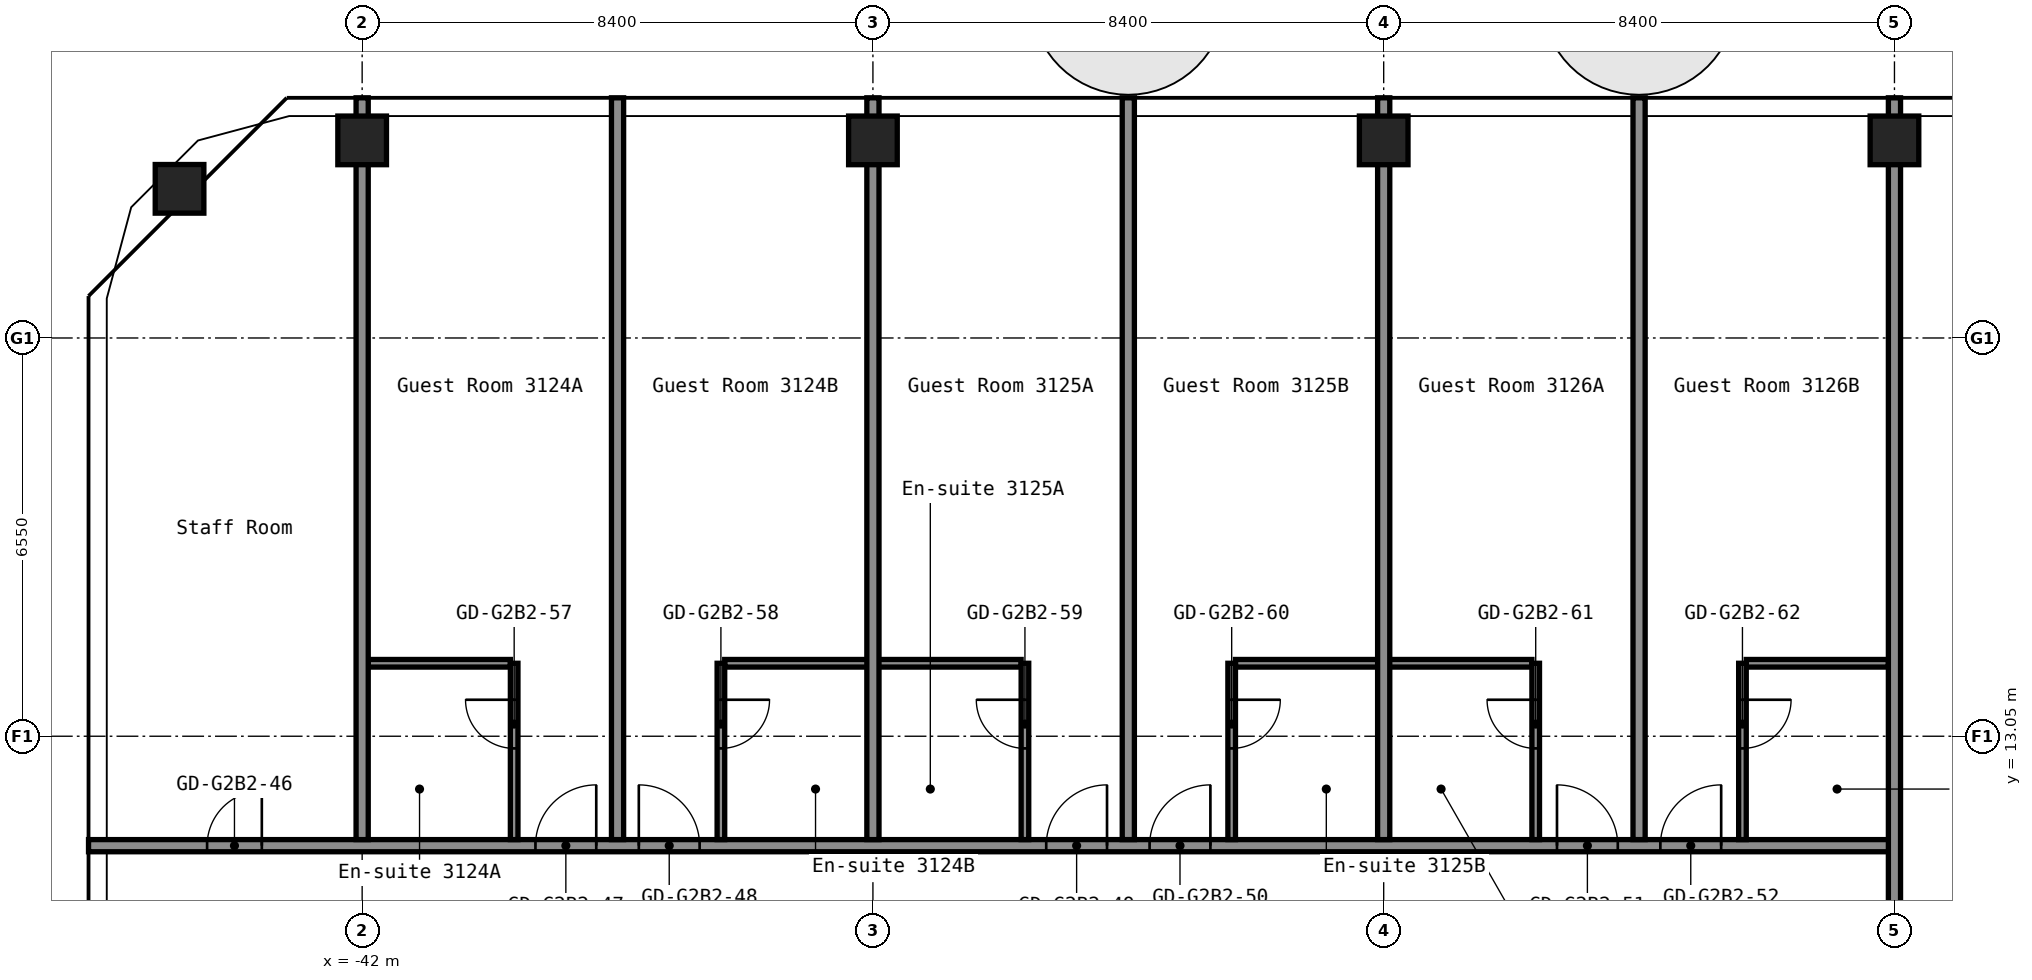
"""IFC4 building model, lengths in metres.
Left out: names, types, materials, properties, quantities, classifications, styles, units other than length and angle.
Written with IfcOpenShell. Run it as: python <this file> out.ifc"""

import sys

from ifc_helpers import new_model, si_unit, direction, frame, frame_2d, origin, origin_2d, place, context, subcontext, project, spatial, rectangle, hollow_rectangle, extrude, element, fill, save


model = new_model("IFC4")
c1 = context("Model", 3, precision=1e-05, world=origin(), true_north=direction((0.0, 1.0)))
c2 = subcontext(c1, "Body", "Model", "MODEL_VIEW")
j1 = project(units=[si_unit("LENGTHUNIT", "METRE"), si_unit("PLANEANGLEUNIT", "RADIAN")], contexts=[c1])
p1 = place(None, origin())
s1 = spatial("IfcSite", under=j1, at=p1, CompositionType="ELEMENT")
p2 = place(p1, origin())
s2 = spatial("IfcBuilding", under=s1, at=p2, CompositionType="ELEMENT")
p3 = place(p2, frame((0.0, 0.0, 110.6)))
s3 = spatial("IfcBuildingStorey", under=s2, at=p3, CompositionType="ELEMENT", Elevation=110.6)
for number, where, z_axis, x_axis in (
    (1, (-45.003, 22.053, 0.0), (0.0, 0.0, 1.0), (1.0, 0.0, 0.0)),
    (2, (-42.0, 22.85, 0.0), (0.0, 0.0, 1.0), (1.0, 0.0, 0.0)),
    (3, (-33.6, 22.85, 0.0), (0.0, 0.0, 1.0), (1.0, 0.0, 0.0)),
    (4, (-25.2, 22.85, 0.0), (0.0, 0.0, 1.0), (1.0, 0.0, 0.0)),
    (5, (-16.8, 22.85, 0.0), (0.0, 0.0, 1.0), (1.0, 0.0, 0.0)),
):
    element("IfcColumn", number, at=place(p3, frame(where, z_axis=z_axis, x_axis=x_axis)), inside=s3, PredefinedType="COLUMN", context=c2, shape_type="SweptSolid", body=[
        extrude(hollow_rectangle(XDim=0.8, YDim=0.8, WallThickness=0.032, at=origin_2d()), origin(), (0.0, 0.0, 1.0), 2.8),
    ])
p4 = place(p3, frame((-46.5, 11.25, 0.0), z_axis=(0.0, 0.0, 1.0), x_axis=(1.0, 0.0, 0.0)))
e6 = element("IfcWall", 6, at=p4, inside=s3, PredefinedType="PARTITIONING", context=c2, shape_type="SweptSolid", body=[
    extrude(rectangle(XDim=29.7, YDim=0.2, at=frame_2d((14.85, 0.0))), origin(), (0.0, 0.0, 1.0), 2.8),
])
p5 = place(p4, frame((1.95, 0.0, 0.0)))
e7 = element("IfcOpeningElement", 7, at=p5, cuts=e6, PredefinedType="OPENING", context=c2, shape_type="SweptSolid", body=[
    extrude(rectangle(XDim=0.9, YDim=2.1, at=frame_2d((0.45, 1.05))), frame((0.0, 0.11, 0.0), z_axis=(0.0, -1.0, 0.0), x_axis=(1.0, 0.0, 0.0)), (0.0, 0.0, 1.0), 0.22),
])
p6 = place(p4, frame((7.35, 0.0, 0.0)))
e8 = element("IfcOpeningElement", 8, at=p6, cuts=e6, PredefinedType="OPENING", context=c2, shape_type="SweptSolid", body=[
    extrude(rectangle(XDim=1.0, YDim=2.1, at=frame_2d((0.5, 1.05))), frame((0.0, 0.11, 0.0), z_axis=(0.0, -1.0, 0.0), x_axis=(1.0, 0.0, 0.0)), (0.0, 0.0, 1.0), 0.22),
])
p7 = place(p4, frame((9.05, 0.0, 0.0)))
e9 = element("IfcOpeningElement", 9, at=p7, cuts=e6, PredefinedType="OPENING", context=c2, shape_type="SweptSolid", body=[
    extrude(rectangle(XDim=1.0, YDim=2.1, at=frame_2d((0.5, 1.05))), frame((0.0, 0.11, 0.0), z_axis=(0.0, -1.0, 0.0), x_axis=(1.0, 0.0, 0.0)), (0.0, 0.0, 1.0), 0.22),
])
p8 = place(p4, frame((15.75, 0.0, 0.0)))
e10 = element("IfcOpeningElement", 10, at=p8, cuts=e6, PredefinedType="OPENING", context=c2, shape_type="SweptSolid", body=[
    extrude(rectangle(XDim=1.0, YDim=2.1, at=frame_2d((0.5, 1.05))), frame((0.0, 0.11, 0.0), z_axis=(0.0, -1.0, 0.0), x_axis=(1.0, 0.0, 0.0)), (0.0, 0.0, 1.0), 0.22),
])
p9 = place(p4, frame((17.45, 0.0, 0.0)))
e11 = element("IfcOpeningElement", 11, at=p9, cuts=e6, PredefinedType="OPENING", context=c2, shape_type="SweptSolid", body=[
    extrude(rectangle(XDim=1.0, YDim=2.1, at=frame_2d((0.5, 1.05))), frame((0.0, 0.11, 0.0), z_axis=(0.0, -1.0, 0.0), x_axis=(1.0, 0.0, 0.0)), (0.0, 0.0, 1.0), 0.22),
])
p10 = place(p4, frame((24.15, 0.0, 0.0)))
e12 = element("IfcOpeningElement", 12, at=p10, cuts=e6, PredefinedType="OPENING", context=c2, shape_type="SweptSolid", body=[
    extrude(rectangle(XDim=1.0, YDim=2.1, at=frame_2d((0.5, 1.05))), frame((0.0, 0.11, 0.0), z_axis=(0.0, -1.0, 0.0), x_axis=(1.0, 0.0, 0.0)), (0.0, 0.0, 1.0), 0.22),
])
p11 = place(p4, frame((25.85, 0.0, 0.0)))
e13 = element("IfcOpeningElement", 13, at=p11, cuts=e6, PredefinedType="OPENING", context=c2, shape_type="SweptSolid", body=[
    extrude(rectangle(XDim=1.0, YDim=2.1, at=frame_2d((0.5, 1.05))), frame((0.0, 0.11, 0.0), z_axis=(0.0, -1.0, 0.0), x_axis=(1.0, 0.0, 0.0)), (0.0, 0.0, 1.0), 0.22),
])
p12 = place(p3, frame((-41.9, 14.25, 0.0), z_axis=(0.0, 0.0, 1.0), x_axis=(1.0, 0.0, 0.0)))
e14 = element("IfcWall", 14, at=p12, inside=s3, PredefinedType="PARTITIONING", context=c2, shape_type="SweptSolid", body=[
    extrude(rectangle(XDim=2.337, YDim=0.125, at=frame_2d((1.169, 0.0))), origin(), (0.0, 0.0, 1.0), 2.8),
])
for number, where, z_axis, x_axis in (
    (15, (-36.038, 14.25, 0.0), (0.0, 0.0, 1.0), (1.0, 0.0, 0.0)),
    (16, (-27.637, 14.25, 0.0), (0.0, 0.0, 1.0), (1.0, 0.0, 0.0)),
):
    element("IfcWall", number, at=place(p3, frame(where, z_axis=z_axis, x_axis=x_axis)), inside=s3, PredefinedType="PARTITIONING", context=c2, shape_type="SweptSolid", body=[
        extrude(rectangle(XDim=4.875, YDim=0.125, at=frame_2d((2.438, 0.0))), origin(), (0.0, 0.0, 1.0), 2.8),
    ])
p13 = place(p3, frame((-19.238, 14.25, 0.0), z_axis=(0.0, 0.0, 1.0), x_axis=(1.0, 0.0, 0.0)))
e17 = element("IfcWall", 17, at=p13, inside=s3, PredefinedType="PARTITIONING", context=c2, shape_type="SweptSolid", body=[
    extrude(rectangle(XDim=2.338, YDim=0.125, at=frame_2d((1.169, 0.0))), origin(), (0.0, 0.0, 1.0), 2.8),
])
p14 = place(p3, frame((-42.0, 11.35, 0.0), z_axis=(0.0, 0.0, 1.0), x_axis=(0.0, 1.0, 0.0)))
e18 = element("IfcWall", 18, at=p14, inside=s3, PredefinedType="PARTITIONING", context=c2, shape_type="SweptSolid", body=[
    extrude(rectangle(XDim=12.2, YDim=0.2, at=frame_2d((6.1, 0.0))), origin(), (0.0, 0.0, 1.0), 2.8),
])
p15 = place(p3, frame((-39.5, 11.35, 0.0), z_axis=(0.0, 0.0, 1.0), x_axis=(0.0, 1.0, 0.0)))
e19 = element("IfcWall", 19, at=p15, inside=s3, PredefinedType="PARTITIONING", context=c2, shape_type="SweptSolid", body=[
    extrude(rectangle(XDim=2.9, YDim=0.125, at=frame_2d((1.45, 0.0))), origin(), (0.0, 0.0, 1.0), 2.8),
])
p16 = place(p15, frame((1.5, 0.0, 0.0)))
e20 = element("IfcOpeningElement", 20, at=p16, cuts=e19, PredefinedType="OPENING", context=c2, shape_type="SweptSolid", body=[
    extrude(rectangle(XDim=0.8, YDim=2.1, at=frame_2d((0.4, 1.05))), frame((0.0, 0.073, 0.0), z_axis=(0.0, -1.0, 0.0), x_axis=(1.0, 0.0, 0.0)), (0.0, 0.0, 1.0), 0.145),
])
p17 = place(p3, frame((-37.8, 11.35, 0.0), z_axis=(0.0, 0.0, 1.0), x_axis=(0.0, 1.0, 0.0)))
e21 = element("IfcWall", 21, at=p17, inside=s3, PredefinedType="PARTITIONING", context=c2, shape_type="SweptSolid", body=[
    extrude(rectangle(XDim=12.2, YDim=0.2, at=frame_2d((6.1, 0.0))), origin(), (0.0, 0.0, 1.0), 2.8),
])
p18 = place(p3, frame((-36.1, 11.35, 0.0), z_axis=(0.0, 0.0, 1.0), x_axis=(0.0, 1.0, 0.0)))
e22 = element("IfcWall", 22, at=p18, inside=s3, PredefinedType="PARTITIONING", context=c2, shape_type="SweptSolid", body=[
    extrude(rectangle(XDim=2.9, YDim=0.125, at=frame_2d((1.45, 0.0))), origin(), (0.0, 0.0, 1.0), 2.8),
])
p19 = place(p18, frame((1.5, 0.0, 0.0)))
e23 = element("IfcOpeningElement", 23, at=p19, cuts=e22, PredefinedType="OPENING", context=c2, shape_type="SweptSolid", body=[
    extrude(rectangle(XDim=0.8, YDim=2.1, at=frame_2d((0.4, 1.05))), frame((0.0, 0.073, 0.0), z_axis=(0.0, -1.0, 0.0), x_axis=(1.0, 0.0, 0.0)), (0.0, 0.0, 1.0), 0.145),
])
p20 = place(p3, frame((-33.6, 11.35, 0.0), z_axis=(0.0, 0.0, 1.0), x_axis=(0.0, 1.0, 0.0)))
e24 = element("IfcWall", 24, at=p20, inside=s3, PredefinedType="PARTITIONING", context=c2, shape_type="SweptSolid", body=[
    extrude(rectangle(XDim=12.2, YDim=0.2, at=frame_2d((6.1, 0.0))), origin(), (0.0, 0.0, 1.0), 2.8),
])
p21 = place(p3, frame((-31.1, 11.35, 0.0), z_axis=(0.0, 0.0, 1.0), x_axis=(0.0, 1.0, 0.0)))
e25 = element("IfcWall", 25, at=p21, inside=s3, PredefinedType="PARTITIONING", context=c2, shape_type="SweptSolid", body=[
    extrude(rectangle(XDim=2.9, YDim=0.125, at=frame_2d((1.45, 0.0))), origin(), (0.0, 0.0, 1.0), 2.8),
])
p22 = place(p21, frame((1.5, 0.0, 0.0)))
e26 = element("IfcOpeningElement", 26, at=p22, cuts=e25, PredefinedType="OPENING", context=c2, shape_type="SweptSolid", body=[
    extrude(rectangle(XDim=0.8, YDim=2.1, at=frame_2d((0.4, 1.05))), frame((0.0, 0.073, 0.0), z_axis=(0.0, -1.0, 0.0), x_axis=(1.0, 0.0, 0.0)), (0.0, 0.0, 1.0), 0.145),
])
p23 = place(p3, frame((-29.4, 11.35, 0.0), z_axis=(0.0, 0.0, 1.0), x_axis=(0.0, 1.0, 0.0)))
e27 = element("IfcWall", 27, at=p23, inside=s3, PredefinedType="PARTITIONING", context=c2, shape_type="SweptSolid", body=[
    extrude(rectangle(XDim=12.2, YDim=0.2, at=frame_2d((6.1, 0.0))), origin(), (0.0, 0.0, 1.0), 2.8),
])
p24 = place(p3, frame((-27.7, 11.35, 0.0), z_axis=(0.0, 0.0, 1.0), x_axis=(0.0, 1.0, 0.0)))
e28 = element("IfcWall", 28, at=p24, inside=s3, PredefinedType="PARTITIONING", context=c2, shape_type="SweptSolid", body=[
    extrude(rectangle(XDim=2.9, YDim=0.125, at=frame_2d((1.45, 0.0))), origin(), (0.0, 0.0, 1.0), 2.8),
])
p25 = place(p24, frame((1.5, 0.0, 0.0)))
e29 = element("IfcOpeningElement", 29, at=p25, cuts=e28, PredefinedType="OPENING", context=c2, shape_type="SweptSolid", body=[
    extrude(rectangle(XDim=0.8, YDim=2.1, at=frame_2d((0.4, 1.05))), frame((0.0, 0.073, 0.0), z_axis=(0.0, -1.0, 0.0), x_axis=(1.0, 0.0, 0.0)), (0.0, 0.0, 1.0), 0.145),
])
p26 = place(p3, frame((-25.2, 11.35, 0.0), z_axis=(0.0, 0.0, 1.0), x_axis=(0.0, 1.0, 0.0)))
e30 = element("IfcWall", 30, at=p26, inside=s3, PredefinedType="PARTITIONING", context=c2, shape_type="SweptSolid", body=[
    extrude(rectangle(XDim=12.2, YDim=0.2, at=frame_2d((6.1, 0.0))), origin(), (0.0, 0.0, 1.0), 2.8),
])
p27 = place(p3, frame((-22.7, 11.35, 0.0), z_axis=(0.0, 0.0, 1.0), x_axis=(0.0, 1.0, 0.0)))
e31 = element("IfcWall", 31, at=p27, inside=s3, PredefinedType="PARTITIONING", context=c2, shape_type="SweptSolid", body=[
    extrude(rectangle(XDim=2.9, YDim=0.125, at=frame_2d((1.45, 0.0))), origin(), (0.0, 0.0, 1.0), 2.8),
])
p28 = place(p27, frame((1.5, 0.0, 0.0)))
e32 = element("IfcOpeningElement", 32, at=p28, cuts=e31, PredefinedType="OPENING", context=c2, shape_type="SweptSolid", body=[
    extrude(rectangle(XDim=0.8, YDim=2.1, at=frame_2d((0.4, 1.05))), frame((0.0, 0.073, 0.0), z_axis=(0.0, -1.0, 0.0), x_axis=(1.0, 0.0, 0.0)), (0.0, 0.0, 1.0), 0.145),
])
p29 = place(p3, frame((-21.0, 11.35, 0.0), z_axis=(0.0, 0.0, 1.0), x_axis=(0.0, 1.0, 0.0)))
e33 = element("IfcWall", 33, at=p29, inside=s3, PredefinedType="PARTITIONING", context=c2, shape_type="SweptSolid", body=[
    extrude(rectangle(XDim=12.2, YDim=0.2, at=frame_2d((6.1, 0.0))), origin(), (0.0, 0.0, 1.0), 2.8),
])
p30 = place(p3, frame((-19.3, 11.35, 0.0), z_axis=(0.0, 0.0, 1.0), x_axis=(0.0, 1.0, 0.0)))
e34 = element("IfcWall", 34, at=p30, inside=s3, PredefinedType="PARTITIONING", context=c2, shape_type="SweptSolid", body=[
    extrude(rectangle(XDim=2.9, YDim=0.125, at=frame_2d((1.45, 0.0))), origin(), (0.0, 0.0, 1.0), 2.8),
])
p31 = place(p30, frame((1.5, 0.0, 0.0)))
e35 = element("IfcOpeningElement", 35, at=p31, cuts=e34, PredefinedType="OPENING", context=c2, shape_type="SweptSolid", body=[
    extrude(rectangle(XDim=0.8, YDim=2.1, at=frame_2d((0.4, 1.05))), frame((0.0, 0.073, 0.0), z_axis=(0.0, -1.0, 0.0), x_axis=(1.0, 0.0, 0.0)), (0.0, 0.0, 1.0), 0.145),
])
p32 = place(p3, frame((-16.8, 10.19, 0.0), z_axis=(0.0, 0.0, 1.0), x_axis=(0.0, 1.0, 0.0)))
e36 = element("IfcWall", 36, at=p32, inside=s3, PredefinedType="PARTITIONING", context=c2, shape_type="SweptSolid", body=[
    extrude(rectangle(XDim=13.36, YDim=0.2, at=frame_2d((6.68, 0.0))), origin(), (0.0, 0.0, 1.0), 2.8),
])
p33 = place(p5, origin())
e37 = element("IfcDoor", 37, at=p33, inside=s3, OperationType="SINGLE_SWING_LEFT", PredefinedType="DOOR", context=c2, shape_type="SweptSolid", body=[
    extrude(rectangle(XDim=0.9, YDim=2.1, at=frame_2d((0.45, 1.05))), frame((0.0, 0.025, 0.0), z_axis=(0.0, -1.0, 0.0), x_axis=(1.0, 0.0, 0.0)), (0.0, 0.0, 1.0), 0.05),
])
fill(e7, e37)
p34 = place(p6, origin())
e38 = element("IfcDoor", 38, at=p34, inside=s3, OperationType="SINGLE_SWING_LEFT", PredefinedType="DOOR", context=c2, shape_type="SweptSolid", body=[
    extrude(rectangle(XDim=1.0, YDim=2.1, at=frame_2d((0.5, 1.05))), frame((0.0, 0.025, 0.0), z_axis=(0.0, -1.0, 0.0), x_axis=(1.0, 0.0, 0.0)), (0.0, 0.0, 1.0), 0.05),
])
fill(e8, e38)
p35 = place(p7, origin())
e39 = element("IfcDoor", 39, at=p35, inside=s3, OperationType="SINGLE_SWING_RIGHT", PredefinedType="DOOR", context=c2, shape_type="SweptSolid", body=[
    extrude(rectangle(XDim=1.0, YDim=2.1, at=frame_2d((0.5, 1.05))), frame((0.0, 0.025, 0.0), z_axis=(0.0, -1.0, 0.0), x_axis=(1.0, 0.0, 0.0)), (0.0, 0.0, 1.0), 0.05),
])
fill(e9, e39)
p36 = place(p8, origin())
e40 = element("IfcDoor", 40, at=p36, inside=s3, OperationType="SINGLE_SWING_LEFT", PredefinedType="DOOR", context=c2, shape_type="SweptSolid", body=[
    extrude(rectangle(XDim=1.0, YDim=2.1, at=frame_2d((0.5, 1.05))), frame((0.0, 0.025, 0.0), z_axis=(0.0, -1.0, 0.0), x_axis=(1.0, 0.0, 0.0)), (0.0, 0.0, 1.0), 0.05),
])
fill(e10, e40)
p37 = place(p9, origin())
e41 = element("IfcDoor", 41, at=p37, inside=s3, OperationType="SINGLE_SWING_LEFT", PredefinedType="DOOR", context=c2, shape_type="SweptSolid", body=[
    extrude(rectangle(XDim=1.0, YDim=2.1, at=frame_2d((0.5, 1.05))), frame((0.0, 0.025, 0.0), z_axis=(0.0, -1.0, 0.0), x_axis=(1.0, 0.0, 0.0)), (0.0, 0.0, 1.0), 0.05),
])
fill(e11, e41)
p38 = place(p10, origin())
e42 = element("IfcDoor", 42, at=p38, inside=s3, OperationType="SINGLE_SWING_RIGHT", PredefinedType="DOOR", context=c2, shape_type="SweptSolid", body=[
    extrude(rectangle(XDim=1.0, YDim=2.1, at=frame_2d((0.5, 1.05))), frame((0.0, 0.025, 0.0), z_axis=(0.0, -1.0, 0.0), x_axis=(1.0, 0.0, 0.0)), (0.0, 0.0, 1.0), 0.05),
])
fill(e12, e42)
p39 = place(p11, origin())
e43 = element("IfcDoor", 43, at=p39, inside=s3, OperationType="SINGLE_SWING_LEFT", PredefinedType="DOOR", context=c2, shape_type="SweptSolid", body=[
    extrude(rectangle(XDim=1.0, YDim=2.1, at=frame_2d((0.5, 1.05))), frame((0.0, 0.025, 0.0), z_axis=(0.0, -1.0, 0.0), x_axis=(1.0, 0.0, 0.0)), (0.0, 0.0, 1.0), 0.05),
])
fill(e13, e43)
p40 = place(p16, origin())
e44 = element("IfcDoor", 44, at=p40, inside=s3, OperationType="SINGLE_SWING_LEFT", PredefinedType="DOOR", context=c2, shape_type="SweptSolid", body=[
    extrude(rectangle(XDim=0.8, YDim=2.1, at=frame_2d((0.4, 1.05))), frame((0.0, 0.025, 0.0), z_axis=(0.0, -1.0, 0.0), x_axis=(1.0, 0.0, 0.0)), (0.0, 0.0, 1.0), 0.05),
])
fill(e20, e44)
p41 = place(p19, origin())
e45 = element("IfcDoor", 45, at=p41, inside=s3, OperationType="SINGLE_SWING_RIGHT", PredefinedType="DOOR", context=c2, shape_type="SweptSolid", body=[
    extrude(rectangle(XDim=0.8, YDim=2.1, at=frame_2d((0.4, 1.05))), frame((0.0, 0.025, 0.0), z_axis=(0.0, -1.0, 0.0), x_axis=(1.0, 0.0, 0.0)), (0.0, 0.0, 1.0), 0.05),
])
fill(e23, e45)
p42 = place(p22, origin())
e46 = element("IfcDoor", 46, at=p42, inside=s3, OperationType="SINGLE_SWING_LEFT", PredefinedType="DOOR", context=c2, shape_type="SweptSolid", body=[
    extrude(rectangle(XDim=0.8, YDim=2.1, at=frame_2d((0.4, 1.05))), frame((0.0, 0.025, 0.0), z_axis=(0.0, -1.0, 0.0), x_axis=(1.0, 0.0, 0.0)), (0.0, 0.0, 1.0), 0.05),
])
fill(e26, e46)
p43 = place(p25, origin())
e47 = element("IfcDoor", 47, at=p43, inside=s3, OperationType="SINGLE_SWING_RIGHT", PredefinedType="DOOR", context=c2, shape_type="SweptSolid", body=[
    extrude(rectangle(XDim=0.8, YDim=2.1, at=frame_2d((0.4, 1.05))), frame((0.0, 0.025, 0.0), z_axis=(0.0, -1.0, 0.0), x_axis=(1.0, 0.0, 0.0)), (0.0, 0.0, 1.0), 0.05),
])
fill(e29, e47)
p44 = place(p28, origin())
e48 = element("IfcDoor", 48, at=p44, inside=s3, OperationType="SINGLE_SWING_LEFT", PredefinedType="DOOR", context=c2, shape_type="SweptSolid", body=[
    extrude(rectangle(XDim=0.8, YDim=2.1, at=frame_2d((0.4, 1.05))), frame((0.0, 0.025, 0.0), z_axis=(0.0, -1.0, 0.0), x_axis=(1.0, 0.0, 0.0)), (0.0, 0.0, 1.0), 0.05),
])
fill(e32, e48)
p45 = place(p31, origin())
e49 = element("IfcDoor", 49, at=p45, inside=s3, OperationType="SINGLE_SWING_RIGHT", PredefinedType="DOOR", context=c2, shape_type="SweptSolid", body=[
    extrude(rectangle(XDim=0.8, YDim=2.1, at=frame_2d((0.4, 1.05))), frame((0.0, 0.025, 0.0), z_axis=(0.0, -1.0, 0.0), x_axis=(1.0, 0.0, 0.0)), (0.0, 0.0, 1.0), 0.05),
])
fill(e35, e49)
save(model, sys.argv[1])
